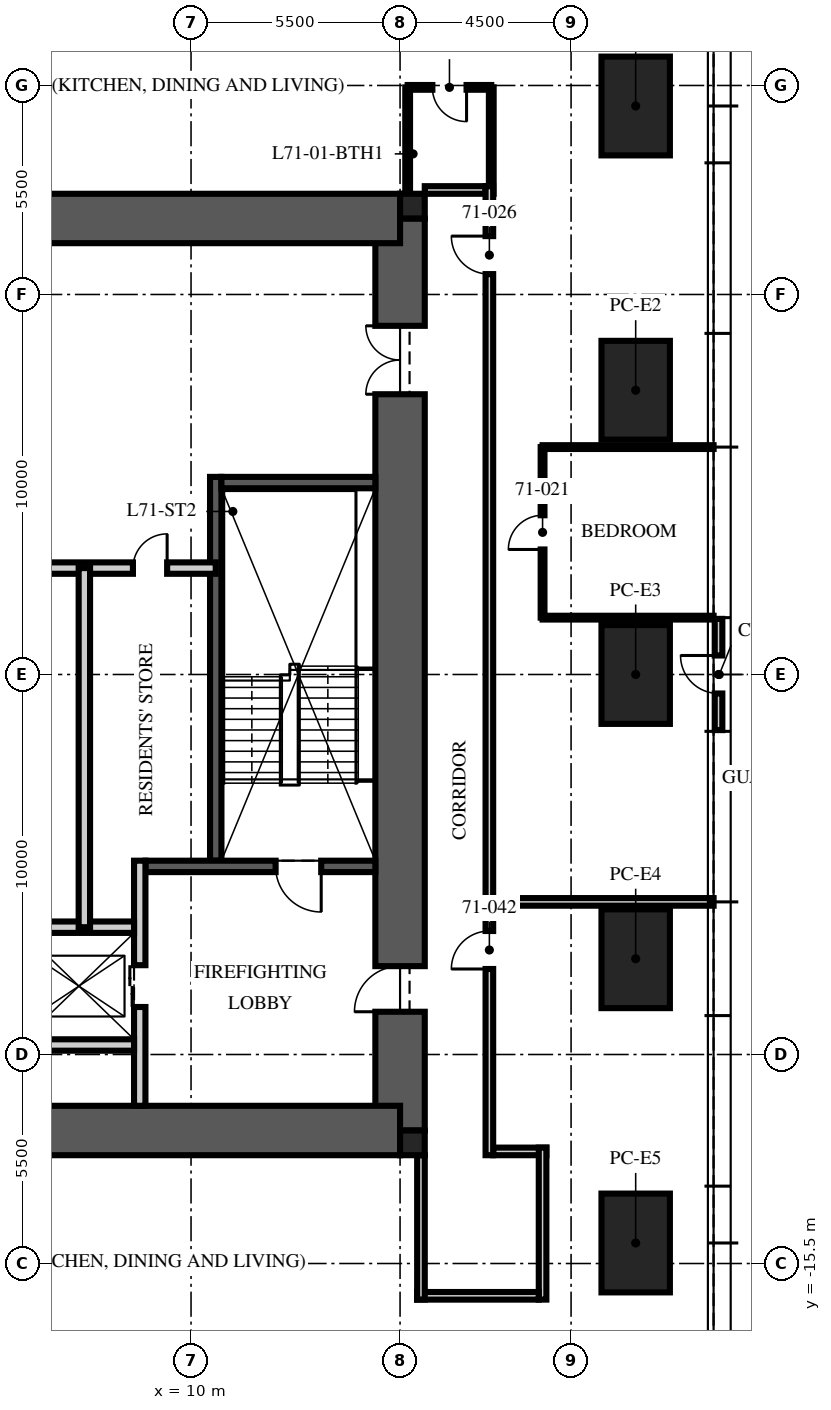
"""IFC4 building model, lengths in metres.
Left out: names, types, materials, properties, quantities, classifications, styles, units other than length and angle.
Written with IfcOpenShell. Run it as: python <this file> out.ifc"""

import sys

from ifc_helpers import new_model, si_unit, direction, frame, frame_2d, origin, origin_2d, place, context, subcontext, project, spatial, rectangle, extrude, element, fill, save


model = new_model("IFC4")
c1 = context("Model", 3, precision=1e-05, world=origin(), true_north=direction((0.0, 1.0)))
c2 = subcontext(c1, "Body", "Model", "MODEL_VIEW")
j1 = project(units=[si_unit("LENGTHUNIT", "METRE"), si_unit("PLANEANGLEUNIT", "RADIAN")], contexts=[c1])
p1 = place(None, origin())
s1 = spatial("IfcSite", under=j1, at=p1, CompositionType="ELEMENT")
p2 = place(p1, origin())
s2 = spatial("IfcBuilding", under=s1, at=p2, CompositionType="ELEMENT")
p3 = place(p2, frame((0.0, 0.0, 285.75)))
s3 = spatial("IfcBuildingStorey", under=s2, at=p3, CompositionType="ELEMENT", Elevation=285.75)
p4 = place(p3, frame((15.5, -12.0, -0.25), z_axis=(0.0, 0.0, 1.0), x_axis=(0.0, 1.0, 0.0)))
e1 = element("IfcWall", 1, at=p4, inside=s3, PredefinedType="SHEAR", context=c2, shape_type="SweptSolid", body=[
    extrude(rectangle(XDim=24.0, YDim=1.3, at=frame_2d((12.0, 0.0))), origin(), (0.0, 0.0, 1.0), 3.75),
])
p5 = place(p4, frame((3.125, 0.0, 0.25)))
e2 = element("IfcOpeningElement", 2, at=p5, cuts=e1, PredefinedType="OPENING", context=c2, shape_type="SweptSolid", body=[
    extrude(rectangle(XDim=1.2, YDim=2.1, at=frame_2d((0.6, 1.05))), frame((0.0, 0.66, 0.0), z_axis=(0.0, -1.0, 0.0), x_axis=(1.0, 0.0, 0.0)), (0.0, 0.0, 1.0), 1.32),
])
p6 = place(p4, frame((19.375, 0.0, 0.25)))
e3 = element("IfcOpeningElement", 3, at=p6, cuts=e1, PredefinedType="OPENING", context=c2, shape_type="SweptSolid", body=[
    extrude(rectangle(XDim=1.8, YDim=2.1, at=frame_2d((0.9, 1.05))), frame((0.0, 0.66, 0.0), z_axis=(0.0, -1.0, 0.0), x_axis=(1.0, 0.0, 0.0)), (0.0, 0.0, 1.0), 1.32),
])
for number, where, z_axis, x_axis in (
    (4, (-15.5, 12.0, -0.25), (0.0, 0.0, 1.0), (1.0, 0.0, 0.0)),
    (5, (-15.5, -12.0, -0.25), (0.0, 0.0, 1.0), (1.0, 0.0, 0.0)),
):
    element("IfcWall", number, at=place(p3, frame(where, z_axis=z_axis, x_axis=x_axis)), inside=s3, PredefinedType="SHEAR", context=c2, shape_type="SweptSolid", body=[
        extrude(rectangle(XDim=31.0, YDim=1.3, at=frame_2d((15.5, 0.0))), origin(), (0.0, 0.0, 1.0), 3.75),
    ])
for number, where, z_axis, x_axis in (
    (6, (15.825, 12.325, -0.25), (0.0, 0.0, 1.0), (1.0, 0.0, 0.0)),
    (7, (15.825, -12.325, -0.25), (0.0, 0.0, 1.0), (1.0, 0.0, 0.0)),
):
    element("IfcColumn", number, at=place(p3, frame(where, z_axis=z_axis, x_axis=x_axis)), inside=s3, PredefinedType="COLUMN", context=c2, shape_type="SweptSolid", body=[
        extrude(rectangle(XDim=0.65, YDim=0.65, at=origin_2d()), origin(), (0.0, 0.0, 1.0), 3.75),
    ])
p7 = place(p3, frame((21.7, 14.96, 0.04), z_axis=(0.0, 0.0, 1.0), x_axis=(0.0, 1.0, 0.0)))
e8 = element("IfcColumn", 8, at=p7, inside=s3, PredefinedType="COLUMN", context=c2, shape_type="SweptSolid", body=[
    extrude(rectangle(XDim=2.6, YDim=1.8, at=origin_2d()), origin(), (0.0, 0.0, 1.0), 3.71),
])
p8 = place(p3, frame((21.7, 7.48, -0.09), z_axis=(0.0, 0.0, 1.0), x_axis=(0.0, 1.0, 0.0)))
e9 = element("IfcColumn", 9, at=p8, inside=s3, PredefinedType="COLUMN", context=c2, shape_type="SweptSolid", body=[
    extrude(rectangle(XDim=2.6, YDim=1.8, at=origin_2d()), origin(), (0.0, 0.0, 1.0), 3.84),
])
p9 = place(p3, frame((21.7, 0.0, -0.23), z_axis=(0.0, 0.0, 1.0), x_axis=(0.0, 1.0, 0.0)))
e10 = element("IfcColumn", 10, at=p9, inside=s3, PredefinedType="COLUMN", context=c2, shape_type="SweptSolid", body=[
    extrude(rectangle(XDim=2.6, YDim=1.8, at=origin_2d()), origin(), (0.0, 0.0, 1.0), 3.98),
])
p10 = place(p3, frame((21.7, -7.48, -0.09), z_axis=(0.0, 0.0, 1.0), x_axis=(0.0, 1.0, 0.0)))
e11 = element("IfcColumn", 11, at=p10, inside=s3, PredefinedType="COLUMN", context=c2, shape_type="SweptSolid", body=[
    extrude(rectangle(XDim=2.6, YDim=1.8, at=origin_2d()), origin(), (0.0, 0.0, 1.0), 3.84),
])
p11 = place(p3, frame((21.7, -14.96, 0.04), z_axis=(0.0, 0.0, 1.0), x_axis=(0.0, 1.0, 0.0)))
e12 = element("IfcColumn", 12, at=p11, inside=s3, PredefinedType="COLUMN", context=c2, shape_type="SweptSolid", body=[
    extrude(rectangle(XDim=2.6, YDim=1.8, at=origin_2d()), origin(), (0.0, 0.0, 1.0), 3.71),
])
p12 = place(p3, frame((23.88, -1.463, 0.0), z_axis=(0.0, 0.0, 1.0), x_axis=(0.0, 1.0, 0.0)))
e13 = element("IfcWall", 13, at=p12, inside=s3, PredefinedType="ELEMENTEDWALL", context=c2, shape_type="SweptSolid", body=[
    extrude(rectangle(XDim=2.927, YDim=0.2, at=frame_2d((1.463, 0.0))), origin(), (0.0, 0.0, 1.0), 3.75),
])
p13 = place(p12, frame((0.963, 0.0, 0.0)))
e14 = element("IfcOpeningElement", 14, at=p13, cuts=e13, PredefinedType="OPENING", context=c2, shape_type="SweptSolid", body=[
    extrude(rectangle(XDim=1.0, YDim=2.4, at=frame_2d((0.5, 1.2))), frame((0.0, 0.11, 0.0), z_axis=(0.0, -1.0, 0.0), x_axis=(1.0, 0.0, 0.0)), (0.0, 0.0, 1.0), 0.22),
])
p14 = place(p3, frame((10.65, -4.9, 0.0), z_axis=(0.0, 0.0, 1.0), x_axis=(0.0, 1.0, 0.0)))
e15 = element("IfcWall", 15, at=p14, inside=s3, PredefinedType="SOLIDWALL", context=c2, shape_type="SweptSolid", body=[
    extrude(rectangle(XDim=10.1, YDim=0.3, at=frame_2d((5.05, 0.0))), origin(), (0.0, 0.0, 1.0), 3.5),
])
p15 = place(p3, frame((14.85, -5.05, 0.0), z_axis=(0.0, 0.0, 1.0), x_axis=(-1.0, 0.0, 0.0)))
e16 = element("IfcWall", 16, at=p15, inside=s3, PredefinedType="SOLIDWALL", context=c2, shape_type="SweptSolid", body=[
    extrude(rectangle(XDim=6.05, YDim=0.3, at=frame_2d((3.025, 0.0))), origin(), (0.0, 0.0, 1.0), 3.5),
])
p16 = place(p15, frame((1.425, 0.0, 0.0)))
e17 = element("IfcOpeningElement", 17, at=p16, cuts=e16, PredefinedType="OPENING", context=c2, shape_type="SweptSolid", body=[
    extrude(rectangle(XDim=1.2, YDim=2.1, at=frame_2d((0.6, 1.05))), frame((0.0, 0.16, 0.0), z_axis=(0.0, -1.0, 0.0), x_axis=(1.0, 0.0, 0.0)), (0.0, 0.0, 1.0), 0.32),
])
p17 = place(p3, frame((14.85, 5.05, 0.0), z_axis=(0.0, 0.0, 1.0), x_axis=(-1.0, 0.0, 0.0)))
e18 = element("IfcWall", 18, at=p17, inside=s3, PredefinedType="SOLIDWALL", context=c2, shape_type="SweptSolid", body=[
    extrude(rectangle(XDim=4.05, YDim=0.3, at=frame_2d((2.025, 0.0))), origin(), (0.0, 0.0, 1.0), 3.5),
])
p18 = place(p3, frame((8.65, -11.35, 0.0), z_axis=(0.0, 0.0, 1.0), x_axis=(0.0, 1.0, 0.0)))
e19 = element("IfcWall", 19, at=p18, inside=s3, PredefinedType="PARTITIONING", context=c2, shape_type="SweptSolid", body=[
    extrude(rectangle(XDim=6.45, YDim=0.3, at=frame_2d((3.225, 0.0))), origin(), (0.0, 0.0, 1.0), 3.5),
])
p19 = place(p18, frame((2.6, 0.0, 0.0)))
e20 = element("IfcOpeningElement", 20, at=p19, cuts=e19, PredefinedType="OPENING", context=c2, shape_type="SweptSolid", body=[
    extrude(rectangle(XDim=1.1, YDim=2.1, at=frame_2d((0.55, 1.05))), frame((0.0, 0.16, 0.0), z_axis=(0.0, -1.0, 0.0), x_axis=(1.0, 0.0, 0.0)), (0.0, 0.0, 1.0), 0.32),
])
p20 = place(p3, frame((-8.5, -6.65, 0.0), z_axis=(0.0, 0.0, 1.0), x_axis=(1.0, 0.0, 0.0)))
e21 = element("IfcWall", 21, at=p20, inside=s3, PredefinedType="PARTITIONING", context=c2, shape_type="SweptSolid", body=[
    extrude(rectangle(XDim=17.0, YDim=0.3, at=frame_2d((8.5, 0.0))), origin(), (0.0, 0.0, 1.0), 3.5),
])
p21 = place(p20, frame((7.8, 0.0, 0.0)))
e22 = element("IfcOpeningElement", 22, at=p21, cuts=e21, PredefinedType="OPENING", context=c2, shape_type="SweptSolid", body=[
    extrude(rectangle(XDim=1.3, YDim=2.4, at=frame_2d((0.65, 1.2))), frame((0.0, 0.16, 0.0), z_axis=(0.0, -1.0, 0.0), x_axis=(1.0, 0.0, 0.0)), (0.0, 0.0, 1.0), 0.32),
])
p22 = place(p20, frame((5.65, 0.0, 0.0)))
e23 = element("IfcOpeningElement", 23, at=p22, cuts=e21, PredefinedType="OPENING", context=c2, shape_type="SweptSolid", body=[
    extrude(rectangle(XDim=0.9, YDim=2.1, at=frame_2d((0.45, 1.05))), frame((0.0, 0.16, 0.0), z_axis=(0.0, -1.0, 0.0), x_axis=(1.0, 0.0, 0.0)), (0.0, 0.0, 1.0), 0.32),
])
p23 = place(p20, frame((10.4, 0.0, 0.0)))
e24 = element("IfcOpeningElement", 24, at=p23, cuts=e21, PredefinedType="OPENING", context=c2, shape_type="SweptSolid", body=[
    extrude(rectangle(XDim=0.9, YDim=2.1, at=frame_2d((0.45, 1.05))), frame((0.0, 0.16, 0.0), z_axis=(0.0, -1.0, 0.0), x_axis=(1.0, 0.0, 0.0)), (0.0, 0.0, 1.0), 0.32),
])
p24 = place(p3, frame((5.6, -9.75, 0.0), z_axis=(0.0, 0.0, 1.0), x_axis=(1.0, 0.0, 0.0)))
e25 = element("IfcWall", 25, at=p24, inside=s3, PredefinedType="PARTITIONING", context=c2, shape_type="SweptSolid", body=[
    extrude(rectangle(XDim=2.9, YDim=0.3, at=frame_2d((1.45, 0.0))), origin(), (0.0, 0.0, 1.0), 3.5),
])
p25 = place(p3, frame((-10.65, 2.8, 0.0), z_axis=(0.0, 0.0, 1.0), x_axis=(1.0, 0.0, 0.0)))
e26 = element("IfcWall", 26, at=p25, inside=s3, PredefinedType="PARTITIONING", context=c2, shape_type="SweptSolid", body=[
    extrude(rectangle(XDim=21.3, YDim=0.3, at=frame_2d((10.65, 0.0))), origin(), (0.0, 0.0, 1.0), 3.5),
])
p26 = place(p25, frame((10.05, 0.0, 0.0)))
e27 = element("IfcOpeningElement", 27, at=p26, cuts=e26, PredefinedType="OPENING", context=c2, shape_type="SweptSolid", body=[
    extrude(rectangle(XDim=1.2, YDim=2.1, at=frame_2d((0.6, 1.05))), frame((0.0, 0.16, 0.0), z_axis=(0.0, -1.0, 0.0), x_axis=(1.0, 0.0, 0.0)), (0.0, 0.0, 1.0), 0.32),
])
p27 = place(p25, frame((19.121, 0.0, 0.0)))
e28 = element("IfcOpeningElement", 28, at=p27, cuts=e26, PredefinedType="OPENING", context=c2, shape_type="SweptSolid", body=[
    extrude(rectangle(XDim=0.9, YDim=2.1, at=frame_2d((0.45, 1.05))), frame((0.0, 0.16, 0.0), z_axis=(0.0, -1.0, 0.0), x_axis=(1.0, 0.0, 0.0)), (0.0, 0.0, 1.0), 0.32),
])
p28 = place(p3, frame((7.193, -6.65, 0.0), z_axis=(0.0, 0.0, 1.0), x_axis=(0.0, 1.0, 0.0)))
e29 = element("IfcWall", 29, at=p28, inside=s3, PredefinedType="PARTITIONING", context=c2, shape_type="SweptSolid", body=[
    extrude(rectangle(XDim=9.45, YDim=0.3, at=frame_2d((4.725, 0.0))), origin(), (0.0, 0.0, 1.0), 3.5),
])
p29 = place(p3, frame((17.95, -12.55, 0.0), z_axis=(0.0, 0.0, 1.0), x_axis=(1.0, 0.0, 0.0)))
e30 = element("IfcWall", 30, at=p29, inside=s3, PredefinedType="PARTITIONING", context=c2, shape_type="SweptSolid", body=[
    extrude(rectangle(XDim=1.4, YDim=0.2, at=frame_2d((0.7, 0.0))), origin(), (0.0, 0.0, 1.0), 3.5),
])
p30 = place(p3, frame((19.25, -12.45, 0.0), z_axis=(0.0, 0.0, 1.0), x_axis=(0.0, -1.0, 0.0)))
e31 = element("IfcWall", 31, at=p30, inside=s3, PredefinedType="PARTITIONING", context=c2, shape_type="SweptSolid", body=[
    extrude(rectangle(XDim=4.0, YDim=0.2, at=frame_2d((2.0, 0.0))), origin(), (0.0, 0.0, 1.0), 2.9),
])
p31 = place(p3, frame((19.15, -16.35, 0.0), z_axis=(0.0, 0.0, 1.0), x_axis=(-1.0, 0.0, 0.0)))
e32 = element("IfcWall", 32, at=p31, inside=s3, PredefinedType="PARTITIONING", context=c2, shape_type="SweptSolid", body=[
    extrude(rectangle(XDim=3.2, YDim=0.2, at=frame_2d((1.6, 0.0))), origin(), (0.0, 0.0, 1.0), 2.6),
])
p32 = place(p3, frame((16.05, -16.45, 0.0), z_axis=(0.0, 0.0, 1.0), x_axis=(0.0, 1.0, 0.0)))
e33 = element("IfcWall", 33, at=p32, inside=s3, PredefinedType="PARTITIONING", context=c2, shape_type="SweptSolid", body=[
    extrude(rectangle(XDim=3.8, YDim=0.2, at=frame_2d((1.9, 0.0))), origin(), (0.0, 0.0, 1.0), 2.6),
])
p33 = place(p3, frame((16.15, 12.75, 0.0), z_axis=(0.0, 0.0, 1.0), x_axis=(1.0, 0.0, 0.0)))
e34 = element("IfcWall", 34, at=p33, inside=s3, PredefinedType="PARTITIONING", context=c2, shape_type="SweptSolid", body=[
    extrude(rectangle(XDim=1.6, YDim=0.2, at=frame_2d((0.8, 0.0))), origin(), (0.0, 0.0, 1.0), 2.6),
])
p34 = place(p3, frame((17.95, -5.984, 0.0), z_axis=(0.0, 0.0, 1.0), x_axis=(1.0, 0.0, 0.0)))
e35 = element("IfcWall", 35, at=p34, inside=s3, PredefinedType="PARTITIONING", context=c2, shape_type="SweptSolid", body=[
    extrude(rectangle(XDim=5.8, YDim=0.2, at=frame_2d((2.9, 0.0))), origin(), (0.0, 0.0, 1.0), 3.01),
])
for number, where, z_axis, x_axis in (
    (36, (19.25, 1.496, 0.0), (0.0, 0.0, 1.0), (1.0, 0.0, 0.0)),
    (37, (19.25, 5.984, 0.0), (0.0, 0.0, 1.0), (1.0, 0.0, 0.0)),
):
    element("IfcWall", number, at=place(p3, frame(where, z_axis=z_axis, x_axis=x_axis)), inside=s3, PredefinedType="PARTITIONING", context=c2, shape_type="SweptSolid", body=[
        extrude(rectangle(XDim=4.5, YDim=0.1, at=frame_2d((2.25, 0.0))), origin(), (0.0, 0.0, 1.0), 3.01),
    ])
p35 = place(p3, frame((19.25, 1.496, 0.0), z_axis=(0.0, 0.0, 1.0), x_axis=(0.0, 1.0, 0.0)))
e38 = element("IfcWall", 38, at=p35, inside=s3, PredefinedType="PARTITIONING", context=c2, shape_type="SweptSolid", body=[
    extrude(rectangle(XDim=4.488, YDim=0.1, at=frame_2d((2.244, 0.0))), origin(), (0.0, 0.0, 1.0), 2.91),
])
p36 = place(p35, frame((1.794, 0.0, 0.0)))
e39 = element("IfcOpeningElement", 39, at=p36, cuts=e38, PredefinedType="OPENING", context=c2, shape_type="SweptSolid", body=[
    extrude(rectangle(XDim=0.9, YDim=2.1, at=frame_2d((0.45, 1.05))), frame((0.0, 0.06, 0.0), z_axis=(0.0, -1.0, 0.0), x_axis=(1.0, 0.0, 0.0)), (0.0, 0.0, 1.0), 0.12),
])
p37 = place(p3, frame((17.9, 15.45, 0.0), z_axis=(0.0, 0.0, 1.0), x_axis=(-1.0, 0.0, 0.0)))
e40 = element("IfcWall", 40, at=p37, inside=s3, PredefinedType="PARTITIONING", context=c2, shape_type="SweptSolid", body=[
    extrude(rectangle(XDim=2.2, YDim=0.125, at=frame_2d((1.1, 0.0))), origin(), (0.0, 0.0, 1.0), 2.6),
])
p38 = place(p37, frame((0.65, 0.0, 0.0)))
e41 = element("IfcOpeningElement", 41, at=p38, cuts=e40, PredefinedType="OPENING", context=c2, shape_type="SweptSolid", body=[
    extrude(rectangle(XDim=0.9, YDim=2.1, at=frame_2d((0.45, 1.05))), frame((0.0, 0.073, 0.0), z_axis=(0.0, -1.0, 0.0), x_axis=(1.0, 0.0, 0.0)), (0.0, 0.0, 1.0), 0.145),
])
p39 = place(p3, frame((17.9, 12.65, 0.0), z_axis=(0.0, 0.0, 1.0), x_axis=(0.0, 1.0, 0.0)))
e42 = element("IfcWall", 42, at=p39, inside=s3, PredefinedType="PARTITIONING", context=c2, shape_type="SweptSolid", body=[
    extrude(rectangle(XDim=2.8, YDim=0.125, at=frame_2d((1.4, 0.0))), origin(), (0.0, 0.0, 1.0), 2.9),
])
p40 = place(p3, frame((15.7, 12.65, 0.0), z_axis=(0.0, 0.0, 1.0), x_axis=(0.0, 1.0, 0.0)))
e43 = element("IfcWall", 43, at=p40, inside=s3, PredefinedType="PARTITIONING", context=c2, shape_type="SweptSolid", body=[
    extrude(rectangle(XDim=2.8, YDim=0.125, at=frame_2d((1.4, 0.0))), origin(), (0.0, 0.0, 1.0), 2.6),
])
p41 = place(p3, frame((17.85, -12.65, 0.0), z_axis=(0.0, 0.0, 1.0), x_axis=(0.0, 1.0, 0.0)))
e44 = element("IfcWall", 44, at=p41, inside=s3, PredefinedType="PARTITIONING", context=c2, shape_type="SweptSolid", body=[
    extrude(rectangle(XDim=25.5, YDim=0.2, at=frame_2d((12.75, 0.0))), origin(), (0.0, 0.0, 1.0), 2.9),
])
p42 = place(p41, frame((23.186, 0.0, 0.0)))
e45 = element("IfcOpeningElement", 45, at=p42, cuts=e44, PredefinedType="OPENING", context=c2, shape_type="SweptSolid", body=[
    extrude(rectangle(XDim=1.0, YDim=2.2, at=frame_2d((0.5, 1.1))), frame((0.0, 0.11, 0.0), z_axis=(0.0, -1.0, 0.0), x_axis=(1.0, 0.0, 0.0)), (0.0, 0.0, 1.0), 0.22),
])
p43 = place(p41, frame((4.9, 0.0, 0.0)))
e46 = element("IfcOpeningElement", 46, at=p43, cuts=e44, PredefinedType="OPENING", context=c2, shape_type="SweptSolid", body=[
    extrude(rectangle(XDim=1.0, YDim=2.2, at=frame_2d((0.5, 1.1))), frame((0.0, 0.11, 0.0), z_axis=(0.0, -1.0, 0.0), x_axis=(1.0, 0.0, 0.0)), (0.0, 0.0, 1.0), 0.22),
])
p44 = place(p13, origin())
e47 = element("IfcDoor", 47, at=p44, inside=s3, OperationType="SINGLE_SWING_LEFT", PredefinedType="DOOR", context=c2, shape_type="SweptSolid", body=[
    extrude(rectangle(XDim=1.0, YDim=2.4, at=frame_2d((0.5, 1.2))), frame((0.0, 0.025, 0.0), z_axis=(0.0, -1.0, 0.0), x_axis=(1.0, 0.0, 0.0)), (0.0, 0.0, 1.0), 0.05),
])
fill(e14, e47)
p45 = place(p16, origin())
e48 = element("IfcDoor", 48, at=p45, inside=s3, OperationType="SINGLE_SWING_LEFT", PredefinedType="DOOR", context=c2, shape_type="SweptSolid", body=[
    extrude(rectangle(XDim=1.2, YDim=2.1, at=frame_2d((0.6, 1.05))), frame((0.0, 0.025, 0.0), z_axis=(0.0, -1.0, 0.0), x_axis=(1.0, 0.0, 0.0)), (0.0, 0.0, 1.0), 0.05),
])
fill(e17, e48)
p46 = place(p5, origin())
e49 = element("IfcDoor", 49, at=p46, inside=s3, OperationType="SINGLE_SWING_LEFT", PredefinedType="DOOR", context=c2, shape_type="SweptSolid", body=[
    extrude(rectangle(XDim=1.2, YDim=2.1, at=frame_2d((0.6, 1.05))), frame((0.0, 0.025, 0.0), z_axis=(0.0, -1.0, 0.0), x_axis=(1.0, 0.0, 0.0)), (0.0, 0.0, 1.0), 0.05),
])
fill(e2, e49)
p47 = place(p6, origin())
e50 = element("IfcDoor", 50, at=p47, inside=s3, OperationType="DOUBLE_DOOR_SINGLE_SWING", PredefinedType="DOOR", context=c2, shape_type="SweptSolid", body=[
    extrude(rectangle(XDim=1.8, YDim=2.1, at=frame_2d((0.9, 1.05))), frame((0.0, 0.025, 0.0), z_axis=(0.0, -1.0, 0.0), x_axis=(1.0, 0.0, 0.0)), (0.0, 0.0, 1.0), 0.05),
])
fill(e3, e50)
p48 = place(p19, origin())
e51 = element("IfcDoor", 51, at=p48, inside=s3, OperationType="DOUBLE_DOOR_SLIDING", PredefinedType="DOOR", context=c2, shape_type="SweptSolid", body=[
    extrude(rectangle(XDim=1.1, YDim=2.1, at=frame_2d((0.55, 1.05))), frame((0.0, 0.025, 0.0), z_axis=(0.0, -1.0, 0.0), x_axis=(1.0, 0.0, 0.0)), (0.0, 0.0, 1.0), 0.05),
])
fill(e20, e51)
p49 = place(p27, origin())
e52 = element("IfcDoor", 52, at=p49, inside=s3, OperationType="SINGLE_SWING_RIGHT", PredefinedType="DOOR", context=c2, shape_type="SweptSolid", body=[
    extrude(rectangle(XDim=0.9, YDim=2.1, at=frame_2d((0.45, 1.05))), frame((0.0, 0.025, 0.0), z_axis=(0.0, -1.0, 0.0), x_axis=(1.0, 0.0, 0.0)), (0.0, 0.0, 1.0), 0.05),
])
fill(e28, e52)
p50 = place(p36, origin())
e53 = element("IfcDoor", 53, at=p50, inside=s3, OperationType="SINGLE_SWING_LEFT", PredefinedType="DOOR", context=c2, shape_type="SweptSolid", body=[
    extrude(rectangle(XDim=0.9, YDim=2.1, at=frame_2d((0.45, 1.05))), frame((0.0, 0.025, 0.0), z_axis=(0.0, -1.0, 0.0), x_axis=(1.0, 0.0, 0.0)), (0.0, 0.0, 1.0), 0.05),
])
fill(e39, e53)
p51 = place(p38, origin())
e54 = element("IfcDoor", 54, at=p51, inside=s3, OperationType="SINGLE_SWING_LEFT", PredefinedType="DOOR", context=c2, shape_type="SweptSolid", body=[
    extrude(rectangle(XDim=0.9, YDim=2.1, at=frame_2d((0.45, 1.05))), frame((0.0, 0.025, 0.0), z_axis=(0.0, -1.0, 0.0), x_axis=(1.0, 0.0, 0.0)), (0.0, 0.0, 1.0), 0.05),
])
fill(e41, e54)
p52 = place(p42, origin())
e55 = element("IfcDoor", 55, at=p52, inside=s3, OperationType="SINGLE_SWING_RIGHT", PredefinedType="DOOR", context=c2, shape_type="SweptSolid", body=[
    extrude(rectangle(XDim=1.0, YDim=2.2, at=frame_2d((0.5, 1.1))), frame((0.0, 0.025, 0.0), z_axis=(0.0, -1.0, 0.0), x_axis=(1.0, 0.0, 0.0)), (0.0, 0.0, 1.0), 0.05),
])
fill(e45, e55)
p53 = place(p43, origin())
e56 = element("IfcDoor", 56, at=p53, inside=s3, OperationType="SINGLE_SWING_LEFT", PredefinedType="DOOR", context=c2, shape_type="SweptSolid", body=[
    extrude(rectangle(XDim=1.0, YDim=2.2, at=frame_2d((0.5, 1.1))), frame((0.0, 0.025, 0.0), z_axis=(0.0, -1.0, 0.0), x_axis=(1.0, 0.0, 0.0)), (0.0, 0.0, 1.0), 0.05),
])
fill(e46, e56)
save(model, sys.argv[1])
